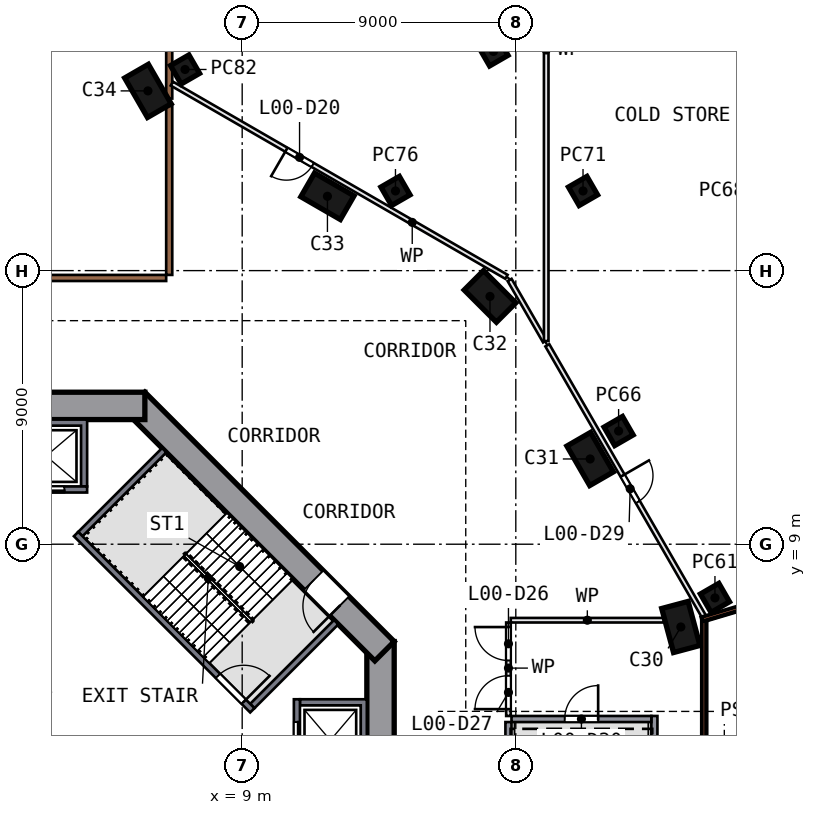
"""IFC4 building model, lengths in metres.
Left out: names, types, materials, properties, quantities, classifications, styles, units other than length and angle.
Written with IfcOpenShell. Run it as: python <this file> out.ifc"""

import sys

from ifc_helpers import new_model, si_unit, direction, frame, frame_2d, origin, origin_2d, place, context, subcontext, project, spatial, polyline, rectangle, outline, extrude, element, fill, save


model = new_model("IFC4")
c1 = context("Model", 3, precision=1e-05, world=origin(), true_north=direction((0.0, 1.0)))
c2 = subcontext(c1, "Body", "Model", "MODEL_VIEW")
j1 = project(units=[si_unit("LENGTHUNIT", "METRE"), si_unit("PLANEANGLEUNIT", "RADIAN")], contexts=[c1])
p1 = place(None, origin())
s1 = spatial("IfcSite", under=j1, at=p1, CompositionType="ELEMENT")
p2 = place(p1, origin())
s2 = spatial("IfcBuilding", under=s1, at=p2, CompositionType="ELEMENT")
p3 = place(p2, origin())
s3 = spatial("IfcBuildingStorey", under=s2, at=p3, CompositionType="ELEMENT", Elevation=0.0)
for number, where, z_axis, x_axis in (
    (1, (23.428, 6.278, 0.0), (0.0, 0.0, 1.0), (0.259, -0.966, 0.0)),
    (2, (20.445, 11.804, 0.0), (0.0, 0.0, 1.0), (-0.5, 0.866, 0.0)),
    (3, (17.151, 17.151, 0.0), (0.0, 0.0, 1.0), (0.707, -0.707, 0.0)),
    (4, (11.804, 20.445, 0.0), (0.0, 0.0, 1.0), (-0.866, 0.5, 0.0)),
    (5, (5.9, 23.912, 0.0), (0.0, 0.0, 1.0), (0.5, -0.866, 0.0)),
):
    element("IfcColumn", number, at=place(p3, frame(where, z_axis=z_axis, x_axis=x_axis)), inside=s3, PredefinedType="COLUMN", context=c2, shape_type="SweptSolid", body=[
        extrude(rectangle(XDim=1.5, YDim=0.9, at=origin_2d()), origin(), (0.0, 0.0, 1.0), 7.55),
    ])
p4 = place(p3, frame((13.55, -5.799, 0.0), z_axis=(0.0, 0.0, 1.0), x_axis=(0.0, 1.0, 0.0)))
e6 = element("IfcWall", 6, at=p4, inside=s3, PredefinedType="SHEAR", context=c2, shape_type="SweptSolid", body=[
    extrude(rectangle(XDim=11.598, YDim=0.9, at=frame_2d((5.799, 0.0))), origin(), (0.0, 0.0, 1.0), 8.0),
])
p5 = place(p4, frame((4.899, 0.0, 0.0)))
e7 = element("IfcOpeningElement", 7, at=p5, cuts=e6, PredefinedType="OPENING", context=c2, shape_type="SweptSolid", body=[
    extrude(rectangle(XDim=1.8, YDim=2.1, at=frame_2d((0.9, 1.05))), frame((0.0, 0.46, 0.0), z_axis=(0.0, -1.0, 0.0), x_axis=(1.0, 0.0, 0.0)), (0.0, 0.0, 1.0), 0.92),
])
p6 = place(p3, frame((13.682, 5.481, 0.0), z_axis=(0.0, 0.0, 1.0), x_axis=(-0.707106781, 0.707106781, 0.0)))
e8 = element("IfcWall", 8, at=p6, inside=s3, PredefinedType="SHEAR", context=c2, shape_type="SweptSolid", body=[
    extrude(rectangle(XDim=11.598, YDim=0.9, at=frame_2d((5.799, 0.0))), origin(), (0.0, 0.0, 1.0), 8.0),
])
p7 = place(p6, frame((2.099, 0.0, 0.0)))
e9 = element("IfcOpeningElement", 9, at=p7, cuts=e8, PredefinedType="OPENING", context=c2, shape_type="SweptSolid", body=[
    extrude(rectangle(XDim=1.2, YDim=2.1, at=frame_2d((0.6, 1.05))), frame((0.0, 0.46, 0.0), z_axis=(0.0, -1.0, 0.0), x_axis=(1.0, 0.0, 0.0)), (0.0, 0.0, 1.0), 0.92),
])
p8 = place(p3, frame((5.799, 13.55, 0.0), z_axis=(0.0, 0.0, 1.0), x_axis=(-1.0, 0.0, 0.0)))
e10 = element("IfcWall", 10, at=p8, inside=s3, PredefinedType="SHEAR", context=c2, shape_type="SweptSolid", body=[
    extrude(rectangle(XDim=11.598, YDim=0.9, at=frame_2d((5.799, 0.0))), origin(), (0.0, 0.0, 1.0), 8.0),
])
p9 = place(p8, frame((4.899, 0.0, 0.0)))
e11 = element("IfcOpeningElement", 11, at=p9, cuts=e10, PredefinedType="OPENING", context=c2, shape_type="SweptSolid", body=[
    extrude(rectangle(XDim=1.8, YDim=2.1, at=frame_2d((0.9, 1.05))), frame((0.0, 0.46, 0.0), z_axis=(0.0, -1.0, 0.0), x_axis=(1.0, 0.0, 0.0)), (0.0, 0.0, 1.0), 0.92),
])
for number, where, z_axis, x_axis in (
    (12, (24.55, 7.234, 0.0), (0.0, 0.0, 1.0), (0.866, 0.5, 0.0)),
    (13, (21.381, 12.723, 0.0), (0.0, 0.0, 1.0), (0.866, 0.5, 0.0)),
    (14, (20.211, 20.62, 0.0), (0.0, 0.0, 1.0), (0.866, 0.5, 0.0)),
    (15, (17.266, 25.211, 0.0), (0.0, 0.0, 1.0), (0.866, 0.5, 0.0)),
    (16, (14.042, 20.62, 0.0), (0.0, 0.0, 1.0), (0.866, 0.5, 0.0)),
    (17, (7.12, 24.616, 0.0), (0.0, 0.0, 1.0), (0.866, 0.5, 0.0)),
):
    element("IfcColumn", number, at=place(p3, frame(where, z_axis=z_axis, x_axis=x_axis)), inside=s3, PredefinedType="COLUMN", context=c2, shape_type="SweptSolid", body=[
        extrude(rectangle(XDim=0.7, YDim=0.7, at=origin_2d()), origin(), (0.0, 0.0, 1.0), 8.0),
    ])
p10 = place(p3, frame((24.188, 6.479, 0.0), z_axis=(0.0, 0.0, 1.0), x_axis=(0.0, -1.0, 0.0)))
e18 = element("IfcWall", 18, at=p10, inside=s3, PredefinedType="SOLIDWALL", context=c2, shape_type="SweptSolid", body=[
    extrude(rectangle(XDim=13.1, YDim=0.14, at=frame_2d((6.55, 0.0))), origin(), (0.0, 0.0, 1.0), 7.55),
])
p11 = place(p10, frame((9.29, 0.0, 0.0)))
e19 = element("IfcOpeningElement", 19, at=p11, cuts=e18, PredefinedType="OPENING", context=c2, shape_type="SweptSolid", body=[
    extrude(rectangle(XDim=1.1, YDim=2.4, at=frame_2d((0.55, 1.2))), frame((0.0, 0.08, 0.0), z_axis=(0.0, -1.0, 0.0), x_axis=(1.0, 0.0, 0.0)), (0.0, 0.0, 1.0), 0.16),
])
p12 = place(p3, frame((24.118, 6.531, 0.0), z_axis=(0.0, 0.0, 1.0), x_axis=(0.958329382, 0.28566553, 0.0)))
e20 = element("IfcWall", 20, at=p12, inside=s3, PredefinedType="SOLIDWALL", context=c2, shape_type="SweptSolid", body=[
    extrude(rectangle(XDim=12.398, YDim=0.14, at=frame_2d((6.199, 0.0))), origin(), (0.0, 0.0, 1.0), 7.55),
])
p13 = place(p3, origin())
e21 = element("IfcWall", 21, at=p13, inside=s3, PredefinedType="SOLIDWALL", context=c2, shape_type="SweptSolid", body=[
    extrude(outline(polyline([(13.1, 3.9), (13.1, 1.2), (10.9, 1.2), (10.9, 1.4), (12.9, 1.4), (12.9, 3.7), (10.9, 3.7), (10.9, 3.9), (13.1, 3.9)])), origin(), (0.0, 0.0, 1.0), 7.55),
])
p14 = place(p3, frame((10.8, 1.2, 0.0), z_axis=(0.0, 0.0, 1.0), x_axis=(0.0, 1.0, 0.0)))
e22 = element("IfcWall", 22, at=p14, inside=s3, PredefinedType="SOLIDWALL", context=c2, shape_type="SweptSolid", body=[
    extrude(rectangle(XDim=2.7, YDim=0.2, at=frame_2d((1.35, 0.0))), origin(), (0.0, 0.0, 1.0), 7.55),
])
p15 = place(p14, frame((0.75, 0.0, 0.0)))
e23 = element("IfcOpeningElement", 23, at=p15, cuts=e22, PredefinedType="OPENING", context=c2, shape_type="SweptSolid", body=[
    extrude(rectangle(XDim=1.2, YDim=2.1, at=frame_2d((0.6, 1.05))), frame((0.0, 0.11, 0.0), z_axis=(0.0, -1.0, 0.0), x_axis=(1.0, 0.0, 0.0)), (0.0, 0.0, 1.0), 0.22),
])
p16 = place(p3, origin())
e24 = element("IfcWall", 24, at=p16, inside=s3, PredefinedType="SOLIDWALL", context=c2, shape_type="SweptSolid", body=[
    extrude(outline(polyline([(3.9, 13.1), (3.9, 10.9), (3.7, 10.9), (3.7, 12.9), (1.4, 12.9), (1.4, 10.9), (1.2, 10.9), (1.2, 13.1), (3.9, 13.1)])), origin(), (0.0, 0.0, 1.0), 7.55),
])
p17 = place(p3, frame((1.2, 10.8, 0.0), z_axis=(0.0, 0.0, 1.0), x_axis=(1.0, 0.0, 0.0)))
e25 = element("IfcWall", 25, at=p17, inside=s3, PredefinedType="SOLIDWALL", context=c2, shape_type="SweptSolid", body=[
    extrude(rectangle(XDim=2.7, YDim=0.2, at=frame_2d((1.35, 0.0))), origin(), (0.0, 0.0, 1.0), 7.55),
])
p18 = place(p17, frame((0.75, 0.0, 0.0)))
e26 = element("IfcOpeningElement", 26, at=p18, cuts=e25, PredefinedType="OPENING", context=c2, shape_type="SweptSolid", body=[
    extrude(rectangle(XDim=1.2, YDim=2.1, at=frame_2d((0.6, 1.05))), frame((0.0, 0.11, 0.0), z_axis=(0.0, -1.0, 0.0), x_axis=(1.0, 0.0, 0.0)), (0.0, 0.0, 1.0), 0.22),
])
p19 = place(p3, frame((3.535, 9.334, 0.0), z_axis=(0.0, 0.0, 1.0), x_axis=(0.707106781, -0.707106781, 0.0)))
e27 = element("IfcWall", 27, at=p19, inside=s3, PredefinedType="SOLIDWALL", context=c2, shape_type="SweptSolid", body=[
    extrude(rectangle(XDim=8.2, YDim=0.2, at=frame_2d((4.1, 0.0))), origin(), (0.0, 0.0, 1.0), 7.55),
])
p20 = place(p19, frame((6.6, 0.0, 0.0)))
e28 = element("IfcOpeningElement", 28, at=p20, cuts=e27, PredefinedType="OPENING", context=c2, shape_type="SweptSolid", body=[
    extrude(rectangle(XDim=1.2, YDim=2.1, at=frame_2d((0.6, 1.05))), frame((0.0, 0.11, 0.0), z_axis=(0.0, -1.0, 0.0), x_axis=(1.0, 0.0, 0.0)), (0.0, 0.0, 1.0), 0.22),
])
for number, where, z_axis, x_axis in (
    (29, (9.334, 3.677, 0.0), (0.0, 0.0, 1.0), (0.707, 0.707, 0.0)),
    (30, (3.677, 9.334, 0.0), (0.0, 0.0, 1.0), (0.707, 0.707, 0.0)),
):
    element("IfcWall", number, at=place(p3, frame(where, z_axis=z_axis, x_axis=x_axis)), inside=s3, PredefinedType="SOLIDWALL", context=c2, shape_type="SweptSolid", body=[
        extrude(rectangle(XDim=3.9, YDim=0.2, at=frame_2d((1.95, 0.0))), origin(), (0.0, 0.0, 1.0), 7.55),
    ])
p21 = place(p3, frame((-6.5, 17.758, 0.0), z_axis=(0.0, 0.0, 1.0), x_axis=(1.0, 0.0, 0.0)))
e31 = element("IfcWall", 31, at=p21, inside=s3, PredefinedType="SOLIDWALL", context=c2, shape_type="SweptSolid", body=[
    extrude(rectangle(XDim=13.0, YDim=0.2, at=frame_2d((6.5, 0.0))), origin(), (0.0, 0.0, 1.0), 7.55),
])
p22 = place(p3, frame((6.6, 17.858, 0.0), z_axis=(0.0, 0.0, 1.0), x_axis=(0.0, 1.0, 0.0)))
e32 = element("IfcWall", 32, at=p22, inside=s3, PredefinedType="SOLIDWALL", context=c2, shape_type="SweptSolid", body=[
    extrude(rectangle(XDim=5.557, YDim=0.2, at=frame_2d((2.778, 0.0))), origin(), (0.0, 0.0, 1.0), 7.55),
])
p23 = place(p3, frame((6.6, 23.659, 0.0), z_axis=(0.0, 0.0, 1.0), x_axis=(0.0, 1.0, 0.0)))
e33 = element("IfcWall", 33, at=p23, inside=s3, PredefinedType="SOLIDWALL", context=c2, shape_type="SweptSolid", body=[
    extrude(rectangle(XDim=10.841, YDim=0.2, at=frame_2d((5.42, 0.0))), origin(), (0.0, 0.0, 1.0), 7.55),
])
p24 = place(p3, frame((17.693, 17.796, 0.0), z_axis=(0.0, 0.0, 1.0), x_axis=(-0.866027563, 0.499996261, 0.0)))
e34 = element("IfcWall", 34, at=p24, inside=s3, PredefinedType="PARTITIONING", context=c2, shape_type="SweptSolid", body=[
    extrude(rectangle(XDim=12.709, YDim=0.15, at=frame_2d((6.355, 0.0))), origin(), (0.0, 0.0, 1.0), 7.55),
])
p25 = place(p24, frame((7.36, 0.0, 0.0)))
e35 = element("IfcOpeningElement", 35, at=p25, cuts=e34, PredefinedType="OPENING", context=c2, shape_type="SweptSolid", body=[
    extrude(rectangle(XDim=1.0, YDim=2.1, at=frame_2d((0.5, 1.05))), frame((0.0, 0.085, 0.0), z_axis=(0.0, -1.0, 0.0), x_axis=(1.0, 0.0, 0.0)), (0.0, 0.0, 1.0), 0.17),
])
p26 = place(p3, frame((17.758, 3.15, 0.0), z_axis=(0.0, 0.0, 1.0), x_axis=(0.0, -1.0, 0.0)))
e36 = element("IfcWall", 36, at=p26, inside=s3, PredefinedType="SOLIDWALL", context=c2, shape_type="SweptSolid", body=[
    extrude(rectangle(XDim=9.3, YDim=0.2, at=frame_2d((4.65, 0.0))), origin(), (0.0, 0.0, 1.0), 7.55),
])
p27 = place(p3, frame((17.758, 3.35, 0.0), z_axis=(0.0, 0.0, 1.0), x_axis=(0.0, 1.0, 0.0)))
e37 = element("IfcWall", 37, at=p27, inside=s3, PredefinedType="PARTITIONING", context=c2, shape_type="SweptSolid", body=[
    extrude(rectangle(XDim=3.075, YDim=0.15, at=frame_2d((1.538, 0.0))), origin(), (0.0, 0.0, 1.0), 7.55),
])
p28 = place(p27, frame((1.825, 0.0, 0.0)))
e38 = element("IfcOpeningElement", 38, at=p28, cuts=e37, PredefinedType="OPENING", context=c2, shape_type="SweptSolid", body=[
    extrude(rectangle(XDim=1.1, YDim=2.1, at=frame_2d((0.55, 1.05))), frame((0.0, 0.085, 0.0), z_axis=(0.0, -1.0, 0.0), x_axis=(1.0, 0.0, 0.0)), (0.0, 0.0, 1.0), 0.17),
])
p29 = place(p27, frame((0.225, 0.0, 0.0)))
e39 = element("IfcOpeningElement", 39, at=p29, cuts=e37, PredefinedType="OPENING", context=c2, shape_type="SweptSolid", body=[
    extrude(rectangle(XDim=1.1, YDim=2.1, at=frame_2d((0.55, 1.05))), frame((0.0, 0.085, 0.0), z_axis=(0.0, -1.0, 0.0), x_axis=(1.0, 0.0, 0.0)), (0.0, 0.0, 1.0), 0.17),
])
p30 = place(p3, frame((17.796, 17.693, 0.0), z_axis=(0.0, 0.0, 1.0), x_axis=(0.50002133, -0.866013088, 0.0)))
e40 = element("IfcWall", 40, at=p30, inside=s3, PredefinedType="PARTITIONING", context=c2, shape_type="SweptSolid", body=[
    extrude(rectangle(XDim=2.333, YDim=0.15, at=frame_2d((1.167, 0.0))), origin(), (0.0, 0.0, 1.0), 7.55),
])
p31 = place(p3, frame((19.0, 41.26, 0.0), z_axis=(0.0, 0.0, 1.0), x_axis=(0.0, -1.0, 0.0)))
e41 = element("IfcWall", 41, at=p31, inside=s3, PredefinedType="PARTITIONING", context=c2, shape_type="SweptSolid", body=[
    extrude(rectangle(XDim=25.577, YDim=0.15, at=frame_2d((12.789, 0.0))), origin(), (0.0, 0.0, 1.0), 7.55),
])
p32 = place(p31, frame((5.227, 0.0, 0.0)))
e42 = element("IfcOpeningElement", 42, at=p32, cuts=e41, PredefinedType="OPENING", context=c2, shape_type="SweptSolid", body=[
    extrude(rectangle(XDim=1.0, YDim=2.1, at=frame_2d((0.5, 1.05))), frame((0.0, 0.085, 0.0), z_axis=(0.0, -1.0, 0.0), x_axis=(1.0, 0.0, 0.0)), (0.0, 0.0, 1.0), 0.17),
])
p33 = place(p3, frame((19.037, 15.543, 0.0), z_axis=(0.0, 0.0, 1.0), x_axis=(0.499986809, -0.866033019, 0.0)))
e43 = element("IfcWall", 43, at=p33, inside=s3, PredefinedType="PARTITIONING", context=c2, shape_type="SweptSolid", body=[
    extrude(rectangle(XDim=10.366, YDim=0.15, at=frame_2d((5.183, 0.0))), origin(), (0.0, 0.0, 1.0), 7.55),
])
p34 = place(p33, frame((4.95, 0.0, 0.0)))
e44 = element("IfcOpeningElement", 44, at=p34, cuts=e43, PredefinedType="OPENING", context=c2, shape_type="SweptSolid", body=[
    extrude(rectangle(XDim=1.0, YDim=2.1, at=frame_2d((0.5, 1.05))), frame((0.0, 0.085, 0.0), z_axis=(0.0, -1.0, 0.0), x_axis=(1.0, 0.0, 0.0)), (0.0, 0.0, 1.0), 0.17),
])
p35 = place(p3, frame((22.558, -6.15, 0.0), z_axis=(0.0, 0.0, 1.0), x_axis=(0.0, 1.0, 0.0)))
e45 = element("IfcWall", 45, at=p35, inside=s3, PredefinedType="SOLIDWALL", context=c2, shape_type="SweptSolid", body=[
    extrude(rectangle(XDim=9.5, YDim=0.2, at=frame_2d((4.75, 0.0))), origin(), (0.0, 0.0, 1.0), 7.55),
])
p36 = place(p3, frame((17.858, 3.25, 0.0), z_axis=(0.0, 0.0, 1.0), x_axis=(1.0, 0.0, 0.0)))
e46 = element("IfcWall", 46, at=p36, inside=s3, PredefinedType="SOLIDWALL", context=c2, shape_type="SweptSolid", body=[
    extrude(rectangle(XDim=4.6, YDim=0.2, at=frame_2d((2.3, 0.0))), origin(), (0.0, 0.0, 1.0), 7.55),
])
p37 = place(p36, frame((1.75, 0.0, 0.0)))
e47 = element("IfcOpeningElement", 47, at=p37, cuts=e46, PredefinedType="OPENING", context=c2, shape_type="SweptSolid", body=[
    extrude(rectangle(XDim=1.1, YDim=2.1, at=frame_2d((0.55, 1.05))), frame((0.0, 0.11, 0.0), z_axis=(0.0, -1.0, 0.0), x_axis=(1.0, 0.0, 0.0)), (0.0, 0.0, 1.0), 0.22),
])
p38 = place(p3, frame((22.872, 6.5, 0.0), z_axis=(0.0, 0.0, 1.0), x_axis=(-1.0, 0.0, 0.0)))
e48 = element("IfcWall", 48, at=p38, inside=s3, PredefinedType="PARTITIONING", context=c2, shape_type="SweptSolid", body=[
    extrude(rectangle(XDim=5.038, YDim=0.15, at=frame_2d((2.519, 0.0))), origin(), (0.0, 0.0, 1.0), 7.55),
])
p39 = place(p15, origin())
e49 = element("IfcDoor", 49, at=p39, inside=s3, OperationType="DOUBLE_DOOR_SLIDING", PredefinedType="DOOR", context=c2, shape_type="SweptSolid", body=[
    extrude(rectangle(XDim=1.2, YDim=2.1, at=frame_2d((0.6, 1.05))), frame((0.0, 0.025, 0.0), z_axis=(0.0, -1.0, 0.0), x_axis=(1.0, 0.0, 0.0)), (0.0, 0.0, 1.0), 0.05),
])
fill(e23, e49)
p40 = place(p18, origin())
e50 = element("IfcDoor", 50, at=p40, inside=s3, OperationType="DOUBLE_DOOR_SLIDING", PredefinedType="DOOR", context=c2, shape_type="SweptSolid", body=[
    extrude(rectangle(XDim=1.2, YDim=2.1, at=frame_2d((0.6, 1.05))), frame((0.0, 0.025, 0.0), z_axis=(0.0, -1.0, 0.0), x_axis=(1.0, 0.0, 0.0)), (0.0, 0.0, 1.0), 0.05),
])
fill(e26, e50)
p41 = place(p20, origin())
e51 = element("IfcDoor", 51, at=p41, inside=s3, OperationType="SINGLE_SWING_RIGHT", PredefinedType="DOOR", context=c2, shape_type="SweptSolid", body=[
    extrude(rectangle(XDim=1.2, YDim=2.1, at=frame_2d((0.6, 1.05))), frame((0.0, 0.025, 0.0), z_axis=(0.0, -1.0, 0.0), x_axis=(1.0, 0.0, 0.0)), (0.0, 0.0, 1.0), 0.05),
])
fill(e28, e51)
p42 = place(p7, origin())
e52 = element("IfcDoor", 52, at=p42, inside=s3, OperationType="SINGLE_SWING_LEFT", PredefinedType="DOOR", context=c2, shape_type="SweptSolid", body=[
    extrude(rectangle(XDim=1.2, YDim=2.1, at=frame_2d((0.6, 1.05))), frame((0.0, 0.025, 0.0), z_axis=(0.0, -1.0, 0.0), x_axis=(1.0, 0.0, 0.0)), (0.0, 0.0, 1.0), 0.05),
])
fill(e9, e52)
p43 = place(p25, origin())
e53 = element("IfcDoor", 53, at=p43, inside=s3, OperationType="SINGLE_SWING_RIGHT", PredefinedType="DOOR", context=c2, shape_type="SweptSolid", body=[
    extrude(rectangle(XDim=1.0, YDim=2.1, at=frame_2d((0.5, 1.05))), frame((0.0, 0.025, 0.0), z_axis=(0.0, -1.0, 0.0), x_axis=(1.0, 0.0, 0.0)), (0.0, 0.0, 1.0), 0.05),
])
fill(e35, e53)
p44 = place(p28, origin())
e54 = element("IfcDoor", 54, at=p44, inside=s3, OperationType="SINGLE_SWING_RIGHT", PredefinedType="DOOR", context=c2, shape_type="SweptSolid", body=[
    extrude(rectangle(XDim=1.1, YDim=2.1, at=frame_2d((0.55, 1.05))), frame((0.0, 0.025, 0.0), z_axis=(0.0, -1.0, 0.0), x_axis=(1.0, 0.0, 0.0)), (0.0, 0.0, 1.0), 0.05),
])
fill(e38, e54)
p45 = place(p29, origin())
e55 = element("IfcDoor", 55, at=p45, inside=s3, OperationType="SINGLE_SWING_LEFT", PredefinedType="DOOR", context=c2, shape_type="SweptSolid", body=[
    extrude(rectangle(XDim=1.1, YDim=2.1, at=frame_2d((0.55, 1.05))), frame((0.0, 0.025, 0.0), z_axis=(0.0, -1.0, 0.0), x_axis=(1.0, 0.0, 0.0)), (0.0, 0.0, 1.0), 0.05),
])
fill(e39, e55)
p46 = place(p34, origin())
e56 = element("IfcDoor", 56, at=p46, inside=s3, OperationType="SINGLE_SWING_LEFT", PredefinedType="DOOR", context=c2, shape_type="SweptSolid", body=[
    extrude(rectangle(XDim=1.0, YDim=2.1, at=frame_2d((0.5, 1.05))), frame((0.0, 0.025, 0.0), z_axis=(0.0, -1.0, 0.0), x_axis=(1.0, 0.0, 0.0)), (0.0, 0.0, 1.0), 0.05),
])
fill(e44, e56)
p47 = place(p37, origin())
e57 = element("IfcDoor", 57, at=p47, inside=s3, OperationType="SINGLE_SWING_RIGHT", PredefinedType="DOOR", context=c2, shape_type="SweptSolid", body=[
    extrude(rectangle(XDim=1.1, YDim=2.1, at=frame_2d((0.55, 1.05))), frame((0.0, 0.025, 0.0), z_axis=(0.0, -1.0, 0.0), x_axis=(1.0, 0.0, 0.0)), (0.0, 0.0, 1.0), 0.05),
])
fill(e47, e57)
save(model, sys.argv[1])
